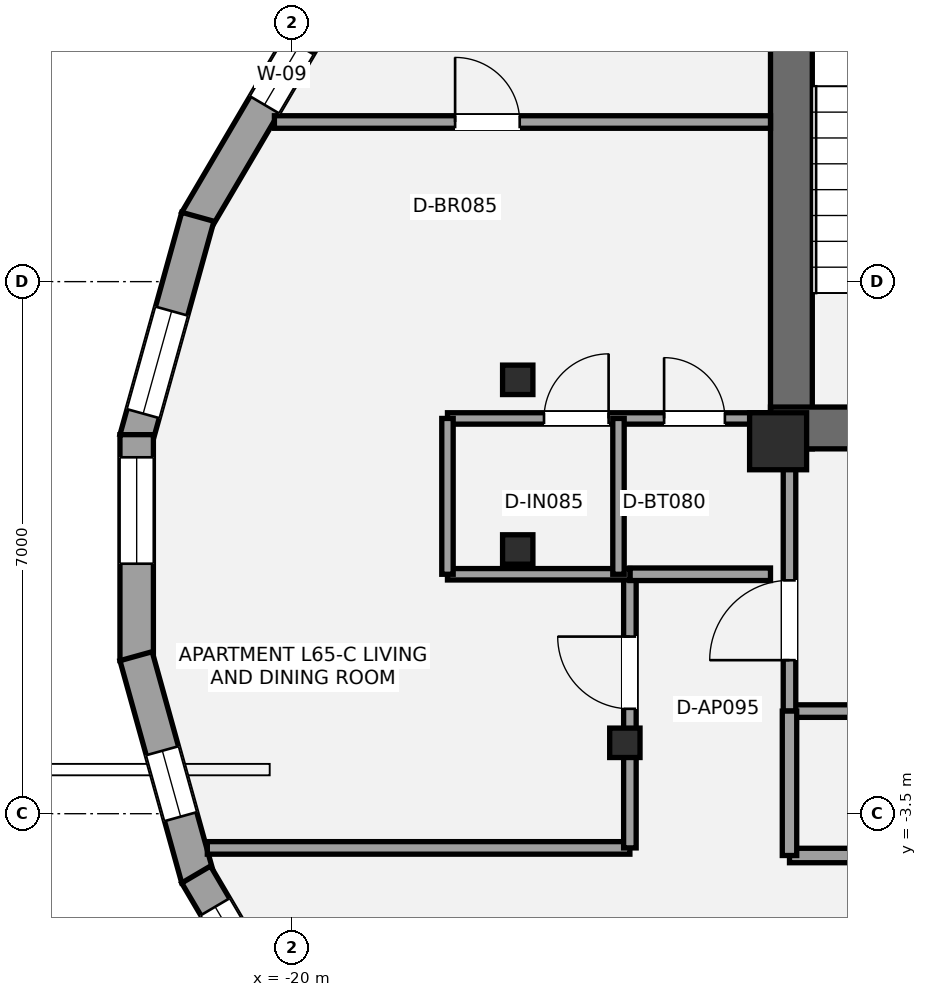
"""IFC4 building model, lengths in metres.
Left out: names, types, materials, properties, quantities, classifications, styles, units other than length and angle.
Written with IfcOpenShell. Run it as: python <this file> out.ifc"""

import sys

from ifc_helpers import new_model, si_unit, direction, frame, frame_2d, origin, origin_2d, place, context, subcontext, project, spatial, rectangle, i_section, extrude, element, fill, save


model = new_model("IFC4")
c1 = context("Model", 3, precision=1e-05, world=origin(), true_north=direction((0.0, 1.0)))
c2 = subcontext(c1, "Body", "Model", "MODEL_VIEW")
j1 = project(units=[si_unit("LENGTHUNIT", "METRE"), si_unit("PLANEANGLEUNIT", "RADIAN")], contexts=[c1])
p1 = place(None, origin())
s1 = spatial("IfcSite", under=j1, at=p1, CompositionType="ELEMENT")
p2 = place(p1, origin())
s2 = spatial("IfcBuilding", under=s1, at=p2, CompositionType="ELEMENT")
p3 = place(p2, frame((0.0, 0.0, 232.05)))
s3 = spatial("IfcBuildingStorey", under=s2, at=p3, CompositionType="ELEMENT", Elevation=232.05)
p4 = place(p3, frame((-13.425, 1.3, 0.0), z_axis=(0.0, 0.0, 1.0), x_axis=(0.0, 1.0, 0.0)))
e1 = element("IfcWall", 1, at=p4, inside=s3, PredefinedType="SHEAR", context=c2, shape_type="SweptSolid", body=[
    extrude(rectangle(XDim=8.25, YDim=0.55, at=frame_2d((4.125, 0.0))), origin(), (0.0, 0.0, 1.0), 3.15),
])
p5 = place(p3, frame((-4.925, 1.575, 0.0), z_axis=(0.0, 0.0, 1.0), x_axis=(-1.0, 0.0, 0.0)))
e2 = element("IfcWall", 2, at=p5, inside=s3, PredefinedType="SHEAR", context=c2, shape_type="SweptSolid", body=[
    extrude(rectangle(XDim=8.775, YDim=0.55, at=frame_2d((4.387, 0.0))), origin(), (0.0, 0.0, 1.0), 3.15),
])
p6 = place(p5, frame((5.375, 0.0, 0.0)))
e3 = element("IfcOpeningElement", 3, at=p6, cuts=e2, PredefinedType="OPENING", context=c2, shape_type="SweptSolid", body=[
    extrude(rectangle(XDim=1.05, YDim=2.15, at=frame_2d((0.525, 1.075))), frame((0.0, 0.285, 0.0), z_axis=(0.0, -1.0, 0.0), x_axis=(1.0, 0.0, 0.0)), (0.0, 0.0, 1.0), 0.57),
])
p7 = place(p5, frame((3.705, 0.0, 0.0)))
e4 = element("IfcOpeningElement", 4, at=p7, cuts=e2, PredefinedType="OPENING", context=c2, shape_type="SweptSolid", body=[
    extrude(rectangle(XDim=1.1, YDim=2.2, at=frame_2d((0.55, 1.1))), frame((0.0, 0.285, 0.0), z_axis=(0.0, -1.0, 0.0), x_axis=(1.0, 0.0, 0.0)), (0.0, 0.0, 1.0), 0.57),
])
p8 = place(p3, frame((-13.6, 1.4, 0.0), z_axis=(0.0, 0.0, 1.0), x_axis=(1.0, 0.0, 0.0)))
e5 = element("IfcColumn", 5, at=p8, inside=s3, PredefinedType="PILASTER", context=c2, shape_type="SweptSolid", body=[
    extrude(rectangle(XDim=0.75, YDim=0.75, at=origin_2d()), origin(), (0.0, 0.0, 1.0), 3.15),
])
for number, where, z_axis, x_axis in (
    (6, (-17.026, 2.208, 0.0), (0.0, 0.0, 1.0), (1.0, 0.0, 0.0)),
    (7, (-17.026, -0.024, 0.0), (0.0, 0.0, 1.0), (1.0, 0.0, 0.0)),
    (8, (-15.616, -2.567, 0.0), (0.0, 0.0, 1.0), (1.0, 0.0, 0.0)),
):
    element("IfcColumn", number, at=place(p3, frame(where, z_axis=z_axis, x_axis=x_axis)), inside=s3, PredefinedType="COLUMN", context=c2, shape_type="SweptSolid", body=[
        extrude(i_section(OverallWidth=0.399, OverallDepth=0.387, WebThickness=0.021, FlangeThickness=0.033, at=origin_2d()), origin(), (0.0, 0.0, 1.0), 3.15),
    ])
p9 = place(p3, frame((-21.257, 4.3, 0.0), z_axis=(0.0, 0.0, 1.0), x_axis=(0.507308799926, 0.861764342218, 0.0)))
e9 = element("IfcWall", 9, at=p9, inside=s3, PredefinedType="STANDARD", context=c2, shape_type="SweptSolid", body=[
    extrude(rectangle(XDim=3.215, YDim=0.44, at=frame_2d((1.607, 0.0))), origin(), (0.0, 0.0, 1.0), 2.336),
])
p10 = place(p9, frame((1.771, 0.0, 0.58)))
e10 = element("IfcOpeningElement", 10, at=p10, cuts=e9, PredefinedType="OPENING", context=c2, shape_type="SweptSolid", body=[
    extrude(rectangle(XDim=0.9, YDim=1.35, at=frame_2d((0.45, 0.675))), frame((0.0, 0.23, 0.0), z_axis=(0.0, -1.0, 0.0), x_axis=(1.0, 0.0, 0.0)), (0.0, 0.0, 1.0), 0.46),
])
p11 = place(p3, frame((-22.047, 1.428, 0.0), z_axis=(0.0, 0.0, 1.0), x_axis=(0.267714373586, 0.963498320795, 0.0)))
e11 = element("IfcWall", 11, at=p11, inside=s3, PredefinedType="STANDARD", context=c2, shape_type="SweptSolid", body=[
    extrude(rectangle(XDim=3.036, YDim=0.44, at=frame_2d((1.518, 0.0))), origin(), (0.0, 0.0, 1.0), 2.336),
])
p12 = place(p11, frame((0.348, 0.0, 0.58)))
e12 = element("IfcOpeningElement", 12, at=p12, cuts=e11, PredefinedType="OPENING", context=c2, shape_type="SweptSolid", body=[
    extrude(rectangle(XDim=1.4, YDim=1.55, at=frame_2d((0.7, 0.775))), frame((0.0, 0.23, 0.0), z_axis=(0.0, -1.0, 0.0), x_axis=(1.0, 0.0, 0.0)), (0.0, 0.0, 1.0), 0.46),
])
p13 = place(p3, frame((-22.039, -1.487, 0.0), z_axis=(0.0, 0.0, 1.0), x_axis=(0.0, 1.0, 0.0)))
e13 = element("IfcWall", 13, at=p13, inside=s3, PredefinedType="STANDARD", context=c2, shape_type="SweptSolid", body=[
    extrude(rectangle(XDim=2.974, YDim=0.44, at=frame_2d((1.487, 0.0))), origin(), (0.0, 0.0, 1.0), 2.336),
])
p14 = place(p13, frame((1.276, 0.0, 0.55)))
e14 = element("IfcOpeningElement", 14, at=p14, cuts=e13, PredefinedType="OPENING", context=c2, shape_type="SweptSolid", body=[
    extrude(rectangle(XDim=1.4, YDim=1.55, at=frame_2d((0.7, 0.775))), frame((0.0, 0.23, 0.0), z_axis=(0.0, -1.0, 0.0), x_axis=(1.0, 0.0, 0.0)), (0.0, 0.0, 1.0), 0.46),
])
p15 = place(p3, frame((-21.235, -4.353, 0.0), z_axis=(0.0, 0.0, 1.0), x_axis=(-0.267714373586, 0.963498320795, 0.0)))
e15 = element("IfcWall", 15, at=p15, inside=s3, PredefinedType="STANDARD", context=c2, shape_type="SweptSolid", body=[
    extrude(rectangle(XDim=3.036, YDim=0.44, at=frame_2d((1.518, 0.0))), origin(), (0.0, 0.0, 1.0), 2.336),
])
p16 = place(p15, frame((0.845, 0.0, 0.58)))
e16 = element("IfcOpeningElement", 16, at=p16, cuts=e15, PredefinedType="OPENING", context=c2, shape_type="SweptSolid", body=[
    extrude(rectangle(XDim=0.9, YDim=1.35, at=frame_2d((0.45, 0.675))), frame((0.0, 0.23, 0.0), z_axis=(0.0, -1.0, 0.0), x_axis=(1.0, 0.0, 0.0)), (0.0, 0.0, 1.0), 0.46),
])
p17 = place(p3, frame((-19.626, -7.071, 0.0), z_axis=(0.0, 0.0, 1.0), x_axis=(-0.507308799926, 0.861764342218, 0.0)))
e17 = element("IfcWall", 17, at=p17, inside=s3, PredefinedType="STANDARD", context=c2, shape_type="SweptSolid", body=[
    extrude(rectangle(XDim=3.215, YDim=0.44, at=frame_2d((1.607, 0.0))), origin(), (0.0, 0.0, 1.0), 2.336),
])
p18 = place(p17, frame((1.323, 0.0, 0.58)))
e18 = element("IfcOpeningElement", 18, at=p18, cuts=e17, PredefinedType="OPENING", context=c2, shape_type="SweptSolid", body=[
    extrude(rectangle(XDim=1.4, YDim=1.55, at=frame_2d((0.7, 0.775))), frame((0.0, 0.23, 0.0), z_axis=(0.0, -1.0, 0.0), x_axis=(1.0, 0.0, 0.0)), (0.0, 0.0, 1.0), 0.46),
])
p19 = place(p3, frame((-13.45, -2.15, 0.0), z_axis=(0.0, 0.0, 1.0), x_axis=(1.0, 0.0, 0.0)))
e19 = element("IfcWall", 19, at=p19, inside=s3, PredefinedType="PARTITIONING", context=c2, shape_type="SweptSolid", body=[
    extrude(rectangle(XDim=6.25, YDim=0.165, at=frame_2d((3.125, 0.0))), origin(), (0.0, 0.0, 1.0), 2.423),
])
p20 = place(p3, frame((-13.45, -2.15, 0.0), z_axis=(0.0, 0.0, 1.0), x_axis=(0.0, 1.0, 0.0)))
e20 = element("IfcWall", 20, at=p20, inside=s3, PredefinedType="PARTITIONING", context=c2, shape_type="SweptSolid", body=[
    extrude(rectangle(XDim=3.5, YDim=0.165, at=frame_2d((1.75, 0.0))), origin(), (0.0, 0.0, 1.0), 2.423),
])
p21 = place(p20, frame((0.67, 0.0, 0.0)))
e21 = element("IfcOpeningElement", 21, at=p21, cuts=e20, PredefinedType="OPENING", context=c2, shape_type="SweptSolid", body=[
    extrude(rectangle(XDim=1.05, YDim=2.15, at=frame_2d((0.525, 1.075))), frame((0.0, 0.093, 0.0), z_axis=(0.0, -1.0, 0.0), x_axis=(1.0, 0.0, 0.0)), (0.0, 0.0, 1.0), 0.185),
])
p22 = place(p3, frame((-13.45, -4.05, 0.0), z_axis=(0.0, 0.0, 1.0), x_axis=(1.0, 0.0, 0.0)))
e22 = element("IfcWall", 22, at=p22, inside=s3, PredefinedType="PLUMBINGWALL", context=c2, shape_type="SweptSolid", body=[
    extrude(rectangle(XDim=11.35, YDim=0.19, at=frame_2d((5.675, 0.0))), origin(), (0.0, 0.0, 1.0), 2.357),
])
p23 = place(p22, frame((1.25, 0.0, 0.0)))
e23 = element("IfcOpeningElement", 23, at=p23, cuts=e22, PredefinedType="OPENING", context=c2, shape_type="SweptSolid", body=[
    extrude(rectangle(XDim=0.95, YDim=2.15, at=frame_2d((0.475, 1.075))), frame((0.0, 0.105, 0.0), z_axis=(0.0, -1.0, 0.0), x_axis=(1.0, 0.0, 0.0)), (0.0, 0.0, 1.0), 0.21),
])
p24 = place(p22, frame((6.16, 0.0, 0.0)))
e24 = element("IfcOpeningElement", 24, at=p24, cuts=e22, PredefinedType="OPENING", context=c2, shape_type="SweptSolid", body=[
    extrude(rectangle(XDim=0.9, YDim=2.1, at=frame_2d((0.45, 1.05))), frame((0.0, 0.105, 0.0), z_axis=(0.0, -1.0, 0.0), x_axis=(1.0, 0.0, 0.0)), (0.0, 0.0, 1.0), 0.21),
])
p25 = place(p3, frame((-13.45, -4.05, 0.0), z_axis=(0.0, 0.0, 1.0), x_axis=(0.0, 1.0, 0.0)))
e25 = element("IfcWall", 25, at=p25, inside=s3, PredefinedType="PLUMBINGWALL", context=c2, shape_type="SweptSolid", body=[
    extrude(rectangle(XDim=1.9, YDim=0.19, at=frame_2d((0.95, 0.0))), origin(), (0.0, 0.0, 1.0), 2.423),
])
p26 = place(p3, frame((-21.11, -3.95, 0.0), z_axis=(0.0, 0.0, 1.0), x_axis=(1.0, 0.0, 0.0)))
e26 = element("IfcWall", 26, at=p26, inside=s3, PredefinedType="PARTITIONING", context=c2, shape_type="SweptSolid", body=[
    extrude(rectangle(XDim=5.56, YDim=0.165, at=frame_2d((2.78, 0.0))), origin(), (0.0, 0.0, 1.0), 2.423),
])
p27 = place(p3, frame((-15.55, -3.95, 0.0), z_axis=(0.0, 0.0, 1.0), x_axis=(0.0, 1.0, 0.0)))
e27 = element("IfcWall", 27, at=p27, inside=s3, PredefinedType="PARTITIONING", context=c2, shape_type="SweptSolid", body=[
    extrude(rectangle(XDim=3.6, YDim=0.165, at=frame_2d((1.8, 0.0))), origin(), (0.0, 0.0, 1.0), 2.357),
])
p28 = place(p27, frame((1.83, 0.0, 0.0)))
e28 = element("IfcOpeningElement", 28, at=p28, cuts=e27, PredefinedType="OPENING", context=c2, shape_type="SweptSolid", body=[
    extrude(rectangle(XDim=0.95, YDim=2.15, at=frame_2d((0.475, 1.075))), frame((0.0, 0.093, 0.0), z_axis=(0.0, -1.0, 0.0), x_axis=(1.0, 0.0, 0.0)), (0.0, 0.0, 1.0), 0.185),
])
p29 = place(p3, frame((-15.55, -0.35, 0.0), z_axis=(0.0, 0.0, 1.0), x_axis=(1.0, 0.0, 0.0)))
e29 = element("IfcWall", 29, at=p29, inside=s3, PredefinedType="PARTITIONING", context=c2, shape_type="SweptSolid", body=[
    extrude(rectangle(XDim=1.85, YDim=0.165, at=frame_2d((0.925, 0.0))), origin(), (0.0, 0.0, 1.0), 2.97),
])
p30 = place(p3, frame((-20.227, 5.6, 0.0), z_axis=(0.0, 0.0, 1.0), x_axis=(1.0, 0.0, 0.0)))
e30 = element("IfcWall", 30, at=p30, inside=s3, PredefinedType="PARTITIONING", context=c2, shape_type="SweptSolid", body=[
    extrude(rectangle(XDim=6.527, YDim=0.165, at=frame_2d((3.264, 0.0))), origin(), (0.0, 0.0, 1.0), 2.423),
])
p31 = place(p30, frame((2.377, 0.0, 0.0)))
e31 = element("IfcOpeningElement", 31, at=p31, cuts=e30, PredefinedType="OPENING", context=c2, shape_type="SweptSolid", body=[
    extrude(rectangle(XDim=0.85, YDim=2.1, at=frame_2d((0.425, 1.05))), frame((0.0, 0.093, 0.0), z_axis=(0.0, -1.0, 0.0), x_axis=(1.0, 0.0, 0.0)), (0.0, 0.0, 1.0), 0.185),
])
p32 = place(p3, frame((-17.95, 1.7, 0.0), z_axis=(0.0, 0.0, 1.0), x_axis=(1.0, 0.0, 0.0)))
e32 = element("IfcWall", 32, at=p32, inside=s3, PredefinedType="PLUMBINGWALL", context=c2, shape_type="SweptSolid", body=[
    extrude(rectangle(XDim=4.25, YDim=0.15, at=frame_2d((2.125, 0.0))), origin(), (0.0, 0.0, 1.0), 2.423),
])
p33 = place(p32, frame((2.85, 0.0, 0.0)))
e33 = element("IfcOpeningElement", 33, at=p33, cuts=e32, PredefinedType="OPENING", context=c2, shape_type="SweptSolid", body=[
    extrude(rectangle(XDim=0.8, YDim=2.1, at=frame_2d((0.4, 1.05))), frame((0.0, 0.085, 0.0), z_axis=(0.0, -1.0, 0.0), x_axis=(1.0, 0.0, 0.0)), (0.0, 0.0, 1.0), 0.17),
])
p34 = place(p32, frame((1.27, 0.0, 0.0)))
e34 = element("IfcOpeningElement", 34, at=p34, cuts=e32, PredefinedType="OPENING", context=c2, shape_type="SweptSolid", body=[
    extrude(rectangle(XDim=0.85, YDim=2.1, at=frame_2d((0.425, 1.05))), frame((0.0, 0.085, 0.0), z_axis=(0.0, -1.0, 0.0), x_axis=(1.0, 0.0, 0.0)), (0.0, 0.0, 1.0), 0.17),
])
p35 = place(p3, frame((-17.95, -0.35, 0.0), z_axis=(0.0, 0.0, 1.0), x_axis=(1.0, 0.0, 0.0)))
e35 = element("IfcWall", 35, at=p35, inside=s3, PredefinedType="PLUMBINGWALL", context=c2, shape_type="SweptSolid", body=[
    extrude(rectangle(XDim=2.4, YDim=0.15, at=frame_2d((1.2, 0.0))), origin(), (0.0, 0.0, 1.0), 2.423),
])
for number, where, z_axis, x_axis in (
    (36, (-15.7, -0.35, 0.0), (0.0, 0.0, 1.0), (0.0, 1.0, 0.0)),
    (37, (-17.95, -0.35, 0.0), (0.0, 0.0, 1.0), (0.0, 1.0, 0.0)),
):
    element("IfcWall", number, at=place(p3, frame(where, z_axis=z_axis, x_axis=x_axis)), inside=s3, PredefinedType="PLUMBINGWALL", context=c2, shape_type="SweptSolid", body=[
        extrude(rectangle(XDim=2.05, YDim=0.15, at=frame_2d((1.025, 0.0))), origin(), (0.0, 0.0, 1.0), 2.423),
    ])
p36 = place(p10, origin())
e38 = element("IfcWindow", 38, at=p36, inside=s3, PartitioningType="SINGLE_PANEL", PredefinedType="WINDOW", context=c2, shape_type="SweptSolid", body=[
    extrude(rectangle(XDim=0.9, YDim=1.35, at=frame_2d((0.45, 0.675))), frame((0.0, -0.01, 0.0), z_axis=(0.0, -1.0, 0.0), x_axis=(1.0, 0.0, 0.0)), (0.0, 0.0, 1.0), 0.06),
])
fill(e10, e38)
p37 = place(p12, origin())
e39 = element("IfcWindow", 39, at=p37, inside=s3, PartitioningType="SINGLE_PANEL", PredefinedType="WINDOW", context=c2, shape_type="SweptSolid", body=[
    extrude(rectangle(XDim=1.4, YDim=1.55, at=frame_2d((0.7, 0.775))), frame((0.0, -0.01, 0.0), z_axis=(0.0, -1.0, 0.0), x_axis=(1.0, 0.0, 0.0)), (0.0, 0.0, 1.0), 0.06),
])
fill(e12, e39)
p38 = place(p14, origin())
e40 = element("IfcWindow", 40, at=p38, inside=s3, PartitioningType="SINGLE_PANEL", PredefinedType="WINDOW", context=c2, shape_type="SweptSolid", body=[
    extrude(rectangle(XDim=1.4, YDim=1.55, at=frame_2d((0.7, 0.775))), frame((0.0, -0.01, 0.0), z_axis=(0.0, -1.0, 0.0), x_axis=(1.0, 0.0, 0.0)), (0.0, 0.0, 1.0), 0.06),
])
fill(e14, e40)
p39 = place(p16, origin())
e41 = element("IfcWindow", 41, at=p39, inside=s3, PartitioningType="SINGLE_PANEL", PredefinedType="WINDOW", context=c2, shape_type="SweptSolid", body=[
    extrude(rectangle(XDim=0.9, YDim=1.35, at=frame_2d((0.45, 0.675))), frame((0.0, -0.01, 0.0), z_axis=(0.0, -1.0, 0.0), x_axis=(1.0, 0.0, 0.0)), (0.0, 0.0, 1.0), 0.06),
])
fill(e16, e41)
p40 = place(p18, origin())
e42 = element("IfcWindow", 42, at=p40, inside=s3, PartitioningType="SINGLE_PANEL", PredefinedType="WINDOW", context=c2, shape_type="SweptSolid", body=[
    extrude(rectangle(XDim=1.4, YDim=1.55, at=frame_2d((0.7, 0.775))), frame((0.0, -0.01, 0.0), z_axis=(0.0, -1.0, 0.0), x_axis=(1.0, 0.0, 0.0)), (0.0, 0.0, 1.0), 0.06),
])
fill(e18, e42)
p41 = place(p21, origin())
e43 = element("IfcDoor", 43, at=p41, inside=s3, OperationType="SINGLE_SWING_LEFT", PredefinedType="DOOR", context=c2, shape_type="SweptSolid", body=[
    extrude(rectangle(XDim=1.05, YDim=2.15, at=frame_2d((0.525, 1.075))), frame((0.0, 0.025, 0.0), z_axis=(0.0, -1.0, 0.0), x_axis=(1.0, 0.0, 0.0)), (0.0, 0.0, 1.0), 0.05),
])
fill(e21, e43)
p42 = place(p28, origin())
e44 = element("IfcDoor", 44, at=p42, inside=s3, OperationType="SINGLE_SWING_RIGHT", PredefinedType="DOOR", context=c2, shape_type="SweptSolid", body=[
    extrude(rectangle(XDim=0.95, YDim=2.15, at=frame_2d((0.475, 1.075))), frame((0.0, 0.025, 0.0), z_axis=(0.0, -1.0, 0.0), x_axis=(1.0, 0.0, 0.0)), (0.0, 0.0, 1.0), 0.05),
])
fill(e28, e44)
p43 = place(p33, origin())
e45 = element("IfcDoor", 45, at=p43, inside=s3, OperationType="SINGLE_SWING_LEFT", PredefinedType="DOOR", context=c2, shape_type="SweptSolid", body=[
    extrude(rectangle(XDim=0.8, YDim=2.1, at=frame_2d((0.4, 1.05))), frame((0.0, 0.025, 0.0), z_axis=(0.0, -1.0, 0.0), x_axis=(1.0, 0.0, 0.0)), (0.0, 0.0, 1.0), 0.05),
])
fill(e33, e45)
p44 = place(p34, origin())
e46 = element("IfcDoor", 46, at=p44, inside=s3, OperationType="SINGLE_SWING_RIGHT", PredefinedType="DOOR", context=c2, shape_type="SweptSolid", body=[
    extrude(rectangle(XDim=0.85, YDim=2.1, at=frame_2d((0.425, 1.05))), frame((0.0, 0.025, 0.0), z_axis=(0.0, -1.0, 0.0), x_axis=(1.0, 0.0, 0.0)), (0.0, 0.0, 1.0), 0.05),
])
fill(e34, e46)
p45 = place(p31, origin())
e47 = element("IfcDoor", 47, at=p45, inside=s3, OperationType="SINGLE_SWING_LEFT", PredefinedType="DOOR", context=c2, shape_type="SweptSolid", body=[
    extrude(rectangle(XDim=0.85, YDim=2.1, at=frame_2d((0.425, 1.05))), frame((0.0, 0.025, 0.0), z_axis=(0.0, -1.0, 0.0), x_axis=(1.0, 0.0, 0.0)), (0.0, 0.0, 1.0), 0.05),
])
fill(e31, e47)
save(model, sys.argv[1])
